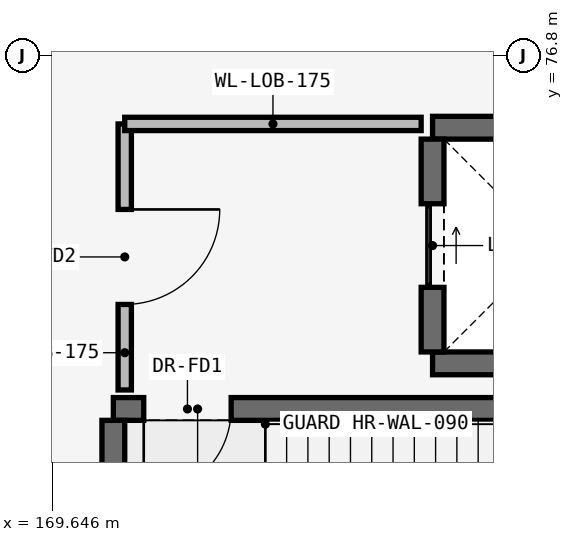
"""IFC4 building model, lengths in metres.
Left out: names, types, materials, properties, quantities, classifications, styles, units other than length and angle.
Written with IfcOpenShell. Run it as: python <this file> out.ifc"""

import sys

from ifc_helpers import new_model, si_unit, direction, frame, frame_2d, origin, place, context, subcontext, project, spatial, rectangle, extrude, element, fill, save


model = new_model("IFC4")
c1 = context("Model", 3, precision=1e-05, world=origin(), true_north=direction((0.0, 1.0)))
c2 = subcontext(c1, "Body", "Model", "MODEL_VIEW")
j1 = project(units=[si_unit("LENGTHUNIT", "METRE"), si_unit("PLANEANGLEUNIT", "RADIAN")], contexts=[c1])
p1 = place(None, origin())
s1 = spatial("IfcSite", under=j1, at=p1, CompositionType="ELEMENT")
p2 = place(p1, origin())
s2 = spatial("IfcBuilding", under=s1, at=p2, CompositionType="ELEMENT")
p3 = place(p2, frame((0.0, 0.0, 10.2)))
s3 = spatial("IfcBuildingStorey", under=s2, at=p3, CompositionType="ELEMENT", Elevation=10.2)
p4 = place(p3, frame((170.45, 72.15, 0.0), z_axis=(0.0, 0.0, 1.0), x_axis=(1.0, 0.0, 0.0)))
e1 = element("IfcWall", 1, at=p4, inside=s3, PredefinedType="SHEAR", context=c2, shape_type="SweptSolid", body=[
    extrude(rectangle(XDim=7.92, YDim=0.3, at=frame_2d((3.96, 0.0))), origin(), (0.0, 0.0, 1.0), 3.94),
])
p5 = place(p4, frame((0.4, 0.0, 0.0)))
e2 = element("IfcOpeningElement", 2, at=p5, cuts=e1, PredefinedType="OPENING", context=c2, shape_type="SweptSolid", body=[
    extrude(rectangle(XDim=1.15, YDim=2.15, at=frame_2d((0.575, 1.075))), frame((0.0, 0.165, 0.0), z_axis=(0.0, -1.0, 0.0), x_axis=(1.0, 0.0, 0.0)), (0.0, 0.0, 1.0), 0.33),
])
p6 = place(p3, frame((170.45, 68.1, 0.0), z_axis=(0.0, 0.0, 1.0), x_axis=(0.0, 1.0, 0.0)))
e3 = element("IfcWall", 3, at=p6, inside=s3, PredefinedType="SHEAR", context=c2, shape_type="SweptSolid", body=[
    extrude(rectangle(XDim=3.9, YDim=0.3, at=frame_2d((1.95, 0.0))), origin(), (0.0, 0.0, 1.0), 3.94),
])
for number, where, z_axis, x_axis in (
    (4, (174.65, 72.75, 0.0), (0.0, 0.0, 1.0), (1.0, 0.0, 0.0)),
    (5, (174.65, 75.85, 0.0), (0.0, 0.0, 1.0), (1.0, 0.0, 0.0)),
):
    element("IfcWall", number, at=place(p3, frame(where, z_axis=z_axis, x_axis=x_axis)), inside=s3, PredefinedType="SHEAR", context=c2, shape_type="SweptSolid", body=[
        extrude(rectangle(XDim=3.1, YDim=0.3, at=frame_2d((1.55, 0.0))), origin(), (0.0, 0.0, 1.0), 3.94),
    ])
p7 = place(p3, frame((174.65, 72.9, 0.0), z_axis=(0.0, 0.0, 1.0), x_axis=(0.0, 1.0, 0.0)))
e6 = element("IfcWall", 6, at=p7, inside=s3, PredefinedType="SHEAR", context=c2, shape_type="SweptSolid", body=[
    extrude(rectangle(XDim=2.8, YDim=0.3, at=frame_2d((1.4, 0.0))), origin(), (0.0, 0.0, 1.0), 3.94),
])
p8 = place(p7, frame((0.85, 0.0, 0.0)))
e7 = element("IfcOpeningElement", 7, at=p8, cuts=e6, PredefinedType="OPENING", context=c2, shape_type="SweptSolid", body=[
    extrude(rectangle(XDim=1.1, YDim=2.15, at=frame_2d((0.55, 1.075))), frame((0.0, 0.165, 0.0), z_axis=(0.0, -1.0, 0.0), x_axis=(1.0, 0.0, 0.0)), (0.0, 0.0, 1.0), 0.33),
])
p9 = place(p3, frame((170.6, 72.4, 0.0), z_axis=(0.0, 0.0, 1.0), x_axis=(0.0, 1.0, 0.0)))
e8 = element("IfcWall", 8, at=p9, inside=s3, PredefinedType="PARTITIONING", context=c2, shape_type="SweptSolid", body=[
    extrude(rectangle(XDim=3.5, YDim=0.175, at=frame_2d((1.75, 0.0))), origin(), (0.0, 0.0, 1.0), 3.94),
])
p10 = place(p9, frame((1.125, 0.0, 0.0)))
e9 = element("IfcOpeningElement", 9, at=p10, cuts=e8, PredefinedType="OPENING", context=c2, shape_type="SweptSolid", body=[
    extrude(rectangle(XDim=1.25, YDim=2.2, at=frame_2d((0.625, 1.1))), frame((0.0, 0.103, 0.0), z_axis=(0.0, -1.0, 0.0), x_axis=(1.0, 0.0, 0.0)), (0.0, 0.0, 1.0), 0.205),
])
p11 = place(p3, frame((170.6, 75.9, 0.0), z_axis=(0.0, 0.0, 1.0), x_axis=(1.0, 0.0, 0.0)))
e10 = element("IfcWall", 10, at=p11, inside=s3, PredefinedType="PARTITIONING", context=c2, shape_type="SweptSolid", body=[
    extrude(rectangle(XDim=3.9, YDim=0.175, at=frame_2d((1.95, 0.0))), origin(), (0.0, 0.0, 1.0), 3.94),
])
p12 = place(p5, frame((1.15, 0.0, 0.0), z_axis=(0.0, 0.0, 1.0), x_axis=(-1.0, 0.0, 0.0)))
e11 = element("IfcDoor", 11, at=p12, inside=s3, OperationType="SINGLE_SWING_LEFT", PredefinedType="DOOR", context=c2, shape_type="SweptSolid", body=[
    extrude(rectangle(XDim=1.15, YDim=2.15, at=frame_2d((0.575, 1.075))), frame((0.0, 0.025, 0.0), z_axis=(0.0, -1.0, 0.0), x_axis=(1.0, 0.0, 0.0)), (0.0, 0.0, 1.0), 0.05),
])
fill(e2, e11)
p13 = place(p8, origin())
e12 = element("IfcDoor", 12, at=p13, inside=s3, OperationType="SLIDING_TO_LEFT", PredefinedType="DOOR", context=c2, shape_type="SweptSolid", body=[
    extrude(rectangle(XDim=1.1, YDim=2.15, at=frame_2d((0.55, 1.075))), frame((0.0, 0.025, 0.0), z_axis=(0.0, -1.0, 0.0), x_axis=(1.0, 0.0, 0.0)), (0.0, 0.0, 1.0), 0.05),
])
fill(e7, e12)
p14 = place(p10, frame((1.25, 0.0, 0.0), z_axis=(0.0, 0.0, 1.0), x_axis=(-1.0, 0.0, 0.0)))
e13 = element("IfcDoor", 13, at=p14, inside=s3, OperationType="SINGLE_SWING_RIGHT", PredefinedType="DOOR", context=c2, shape_type="SweptSolid", body=[
    extrude(rectangle(XDim=1.25, YDim=2.2, at=frame_2d((0.625, 1.1))), frame((0.0, 0.025, 0.0), z_axis=(0.0, -1.0, 0.0), x_axis=(1.0, 0.0, 0.0)), (0.0, 0.0, 1.0), 0.05),
])
fill(e9, e13)
save(model, sys.argv[1])
